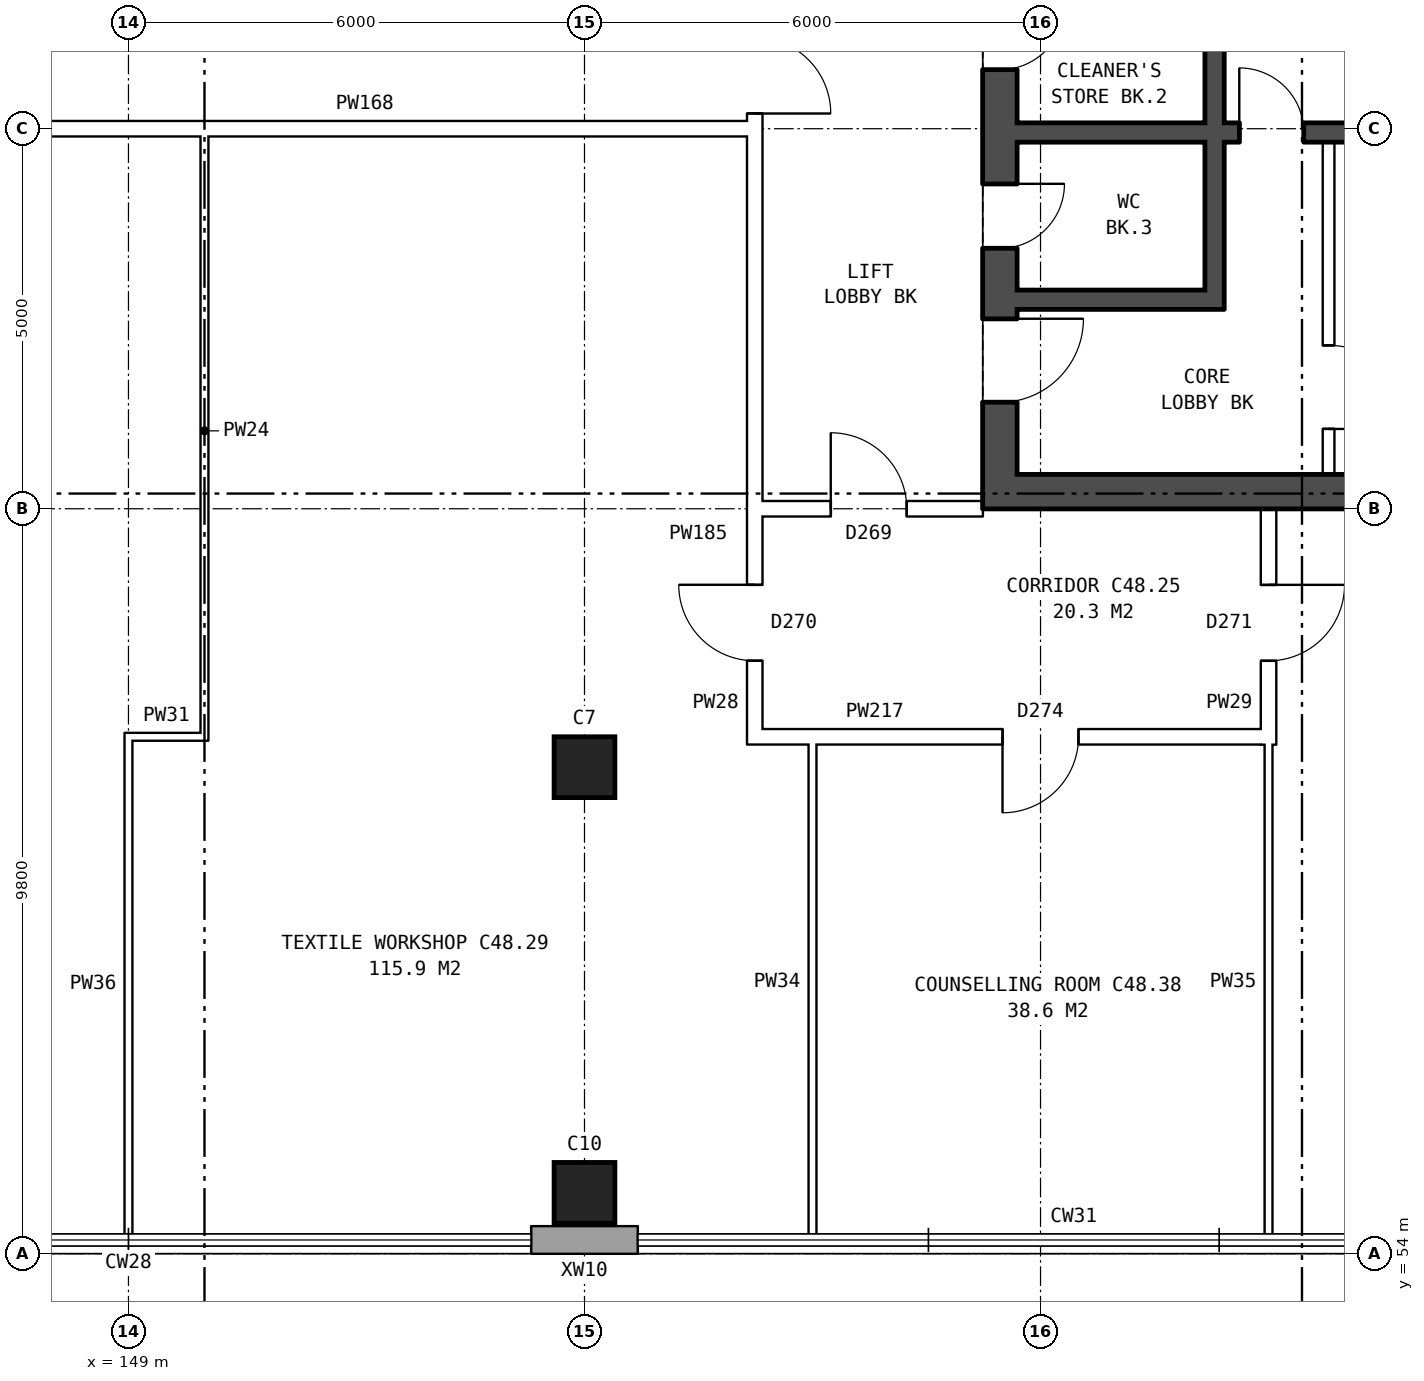
"""IFC4 building model, lengths in metres.
Left out: names, types, materials, properties, quantities, classifications, styles, units other than length and angle.
Written with IfcOpenShell. Run it as: python <this file> out.ifc"""

import sys

from ifc_helpers import new_model, si_unit, direction, frame, frame_2d, origin, origin_2d, place, context, subcontext, project, spatial, rectangle, extrude, element, fill, save


model = new_model("IFC4")
c1 = context("Model", 3, precision=1e-05, world=origin(), true_north=direction((0.0, 1.0)))
c2 = subcontext(c1, "Body", "Model", "MODEL_VIEW")
j1 = project(units=[si_unit("LENGTHUNIT", "METRE"), si_unit("PLANEANGLEUNIT", "RADIAN")], contexts=[c1])
p1 = place(None, origin())
s1 = spatial("IfcSite", under=j1, at=p1, CompositionType="ELEMENT")
p2 = place(p1, origin())
s2 = spatial("IfcBuilding", under=s1, at=p2, CompositionType="ELEMENT")
p3 = place(p2, frame((0.0, 0.0, 171.6)))
s3 = spatial("IfcBuildingStorey", under=s2, at=p3, CompositionType="ELEMENT", Elevation=171.6)
for number, where, z_axis, x_axis in (
    (1, (155.0, 54.8, 0.0), (0.0, 0.0, 1.0), (1.0, 0.0, 0.0)),
    (2, (155.0, 60.4, 0.0), (0.0, 0.0, 1.0), (1.0, 0.0, 0.0)),
):
    element("IfcColumn", number, at=place(p3, frame(where, z_axis=z_axis, x_axis=x_axis)), inside=s3, PredefinedType="COLUMN", context=c2, shape_type="SweptSolid", body=[
        extrude(rectangle(XDim=0.8, YDim=0.8, at=origin_2d()), origin(), (0.0, 0.0, 1.0), 3.6),
    ])
p4 = place(p3, frame((154.3, 54.18, 0.0), z_axis=(0.0, 0.0, 1.0), x_axis=(1.0, 0.0, 0.0)))
e3 = element("IfcWall", 3, at=p4, inside=s3, PredefinedType="STANDARD", context=c2, shape_type="SweptSolid", body=[
    extrude(rectangle(XDim=1.4, YDim=0.36, at=frame_2d((0.7, 0.0))), origin(), (0.0, 0.0, 1.0), 3.6),
])
p5 = place(p3, frame((160.465, 76.2, 0.0), z_axis=(0.0, 0.0, 1.0), x_axis=(0.0, -1.0, 0.0)))
e4 = element("IfcWall", 4, at=p5, inside=s3, PredefinedType="SHEAR", context=c2, shape_type="SweptSolid", body=[
    extrude(rectangle(XDim=12.4, YDim=0.45, at=frame_2d((6.2, 0.0))), origin(), (0.0, 0.0, 1.0), 3.6),
])
p6 = place(p5, frame((1.325, 0.0, 0.0)))
e5 = element("IfcOpeningElement", 5, at=p6, cuts=e4, PredefinedType="OPENING", context=c2, shape_type="SweptSolid", body=[
    extrude(rectangle(XDim=1.1, YDim=2.1, at=frame_2d((0.55, 1.05))), frame((0.0, 0.235, 0.0), z_axis=(0.0, -1.0, 0.0), x_axis=(1.0, 0.0, 0.0)), (0.0, 0.0, 1.0), 0.47),
])
p7 = place(p5, frame((3.625, 0.0, 0.0)))
e6 = element("IfcOpeningElement", 6, at=p7, cuts=e4, PredefinedType="OPENING", context=c2, shape_type="SweptSolid", body=[
    extrude(rectangle(XDim=0.85, YDim=2.1, at=frame_2d((0.425, 1.05))), frame((0.0, 0.235, 0.0), z_axis=(0.0, -1.0, 0.0), x_axis=(1.0, 0.0, 0.0)), (0.0, 0.0, 1.0), 0.47),
])
p8 = place(p5, frame((5.775, 0.0, 0.0)))
e7 = element("IfcOpeningElement", 7, at=p8, cuts=e4, PredefinedType="OPENING", context=c2, shape_type="SweptSolid", body=[
    extrude(rectangle(XDim=0.85, YDim=2.1, at=frame_2d((0.425, 1.05))), frame((0.0, 0.235, 0.0), z_axis=(0.0, -1.0, 0.0), x_axis=(1.0, 0.0, 0.0)), (0.0, 0.0, 1.0), 0.47),
])
p9 = place(p5, frame((9.9, 0.0, 0.0)))
e8 = element("IfcOpeningElement", 8, at=p9, cuts=e4, PredefinedType="OPENING", context=c2, shape_type="SweptSolid", body=[
    extrude(rectangle(XDim=1.1, YDim=2.1, at=frame_2d((0.55, 1.05))), frame((0.0, 0.235, 0.0), z_axis=(0.0, -1.0, 0.0), x_axis=(1.0, 0.0, 0.0)), (0.0, 0.0, 1.0), 0.47),
])
p10 = place(p5, frame((8.125, 0.0, 0.0)))
e9 = element("IfcOpeningElement", 9, at=p10, cuts=e4, PredefinedType="OPENING", context=c2, shape_type="SweptSolid", body=[
    extrude(rectangle(XDim=0.85, YDim=2.1, at=frame_2d((0.425, 1.05))), frame((0.0, 0.235, 0.0), z_axis=(0.0, -1.0, 0.0), x_axis=(1.0, 0.0, 0.0)), (0.0, 0.0, 1.0), 0.47),
])
p11 = place(p3, frame((160.69, 64.025, 0.0), z_axis=(0.0, 0.0, 1.0), x_axis=(1.0, 0.0, 0.0)))
e10 = element("IfcWall", 10, at=p11, inside=s3, PredefinedType="SHEAR", context=c2, shape_type="SweptSolid", body=[
    extrude(rectangle(XDim=7.5, YDim=0.45, at=frame_2d((3.75, 0.0))), origin(), (0.0, 0.0, 1.0), 3.6),
])
p12 = place(p3, frame((160.69, 68.75, 0.0), z_axis=(0.0, 0.0, 1.0), x_axis=(1.0, 0.0, 0.0)))
e11 = element("IfcWall", 11, at=p12, inside=s3, PredefinedType="SHEAR", context=c2, shape_type="SweptSolid", body=[
    extrude(rectangle(XDim=7.5, YDim=0.25, at=frame_2d((3.75, 0.0))), origin(), (0.0, 0.0, 1.0), 3.6),
])
p13 = place(p12, frame((5.075, 0.0, 0.0)))
e12 = element("IfcOpeningElement", 12, at=p13, cuts=e11, PredefinedType="OPENING", context=c2, shape_type="SweptSolid", body=[
    extrude(rectangle(XDim=1.1, YDim=2.1, at=frame_2d((0.55, 1.05))), frame((0.0, 0.135, 0.0), z_axis=(0.0, -1.0, 0.0), x_axis=(1.0, 0.0, 0.0)), (0.0, 0.0, 1.0), 0.27),
])
p14 = place(p12, frame((2.925, 0.0, 0.0)))
e13 = element("IfcOpeningElement", 13, at=p14, cuts=e11, PredefinedType="OPENING", context=c2, shape_type="SweptSolid", body=[
    extrude(rectangle(XDim=0.85, YDim=2.1, at=frame_2d((0.425, 1.05))), frame((0.0, 0.135, 0.0), z_axis=(0.0, -1.0, 0.0), x_axis=(1.0, 0.0, 0.0)), (0.0, 0.0, 1.0), 0.27),
])
p15 = place(p3, frame((160.69, 66.55, 0.0), z_axis=(0.0, 0.0, 1.0), x_axis=(1.0, 0.0, 0.0)))
e14 = element("IfcWall", 14, at=p15, inside=s3, PredefinedType="SHEAR", context=c2, shape_type="SweptSolid", body=[
    extrude(rectangle(XDim=2.475, YDim=0.25, at=frame_2d((1.238, 0.0))), origin(), (0.0, 0.0, 1.0), 3.6),
])
p16 = place(p3, frame((163.29, 73.025, 0.0), z_axis=(0.0, 0.0, 1.0), x_axis=(0.0, -1.0, 0.0)))
e15 = element("IfcWall", 15, at=p16, inside=s3, PredefinedType="SHEAR", context=c2, shape_type="SweptSolid", body=[
    extrude(rectangle(XDim=4.15, YDim=0.25, at=frame_2d((2.075, 0.0))), origin(), (0.0, 0.0, 1.0), 3.6),
])
p17 = place(p3, frame((163.29, 68.625, 0.0), z_axis=(0.0, 0.0, 1.0), x_axis=(0.0, -1.0, 0.0)))
e16 = element("IfcWall", 16, at=p17, inside=s3, PredefinedType="SHEAR", context=c2, shape_type="SweptSolid", body=[
    extrude(rectangle(XDim=2.2, YDim=0.25, at=frame_2d((1.1, 0.0))), origin(), (0.0, 0.0, 1.0), 3.6),
])
p18 = place(p3, frame((164.79, 68.625, 0.0), z_axis=(0.0, 0.0, 1.0), x_axis=(0.0, -1.0, 0.0)))
e17 = element("IfcWall", 17, at=p18, inside=s3, PredefinedType="PARTITIONING", context=c2, shape_type="SweptSolid", body=[
    extrude(rectangle(XDim=4.375, YDim=0.15, at=frame_2d((2.188, 0.0))), origin(), (0.0, 0.0, 1.0), 3.6),
])
p19 = place(p18, frame((2.675, 0.0, 0.0)))
e18 = element("IfcOpeningElement", 18, at=p19, cuts=e17, PredefinedType="OPENING", context=c2, shape_type="SweptSolid", body=[
    extrude(rectangle(XDim=1.1, YDim=2.1, at=frame_2d((0.55, 1.05))), frame((0.0, 0.085, 0.0), z_axis=(0.0, -1.0, 0.0), x_axis=(1.0, 0.0, 0.0)), (0.0, 0.0, 1.0), 0.17),
])
p20 = place(p3, frame((157.24, 63.9, 0.0), z_axis=(0.0, 0.0, 1.0), x_axis=(0.0, 1.0, 0.0)))
e19 = element("IfcWall", 19, at=p20, inside=s3, PredefinedType="PARTITIONING", context=c2, shape_type="SweptSolid", body=[
    extrude(rectangle(XDim=12.2, YDim=0.2, at=frame_2d((6.1, 0.0))), origin(), (0.0, 0.0, 1.0), 3.6),
])
p21 = place(p20, frame((5.1, 0.0, 0.0)))
e20 = element("IfcOpeningElement", 20, at=p21, cuts=e19, PredefinedType="OPENING", context=c2, shape_type="SweptSolid", body=[
    extrude(rectangle(XDim=2.0, YDim=2.1, at=frame_2d((1.0, 1.05))), frame((0.0, 0.11, 0.0), z_axis=(0.0, -1.0, 0.0), x_axis=(1.0, 0.0, 0.0)), (0.0, 0.0, 1.0), 0.22),
])
p22 = place(p3, frame((157.14, 60.8, 0.0), z_axis=(0.0, 0.0, 1.0), x_axis=(1.0, 0.0, 0.0)))
e21 = element("IfcWall", 21, at=p22, inside=s3, PredefinedType="PARTITIONING", context=c2, shape_type="SweptSolid", body=[
    extrude(rectangle(XDim=6.96, YDim=0.2, at=frame_2d((3.48, 0.0))), origin(), (0.0, 0.0, 1.0), 3.6),
])
p23 = place(p22, frame((3.36, 0.0, 0.0)))
e22 = element("IfcOpeningElement", 22, at=p23, cuts=e21, PredefinedType="OPENING", context=c2, shape_type="SweptSolid", body=[
    extrude(rectangle(XDim=1.0, YDim=2.1, at=frame_2d((0.5, 1.05))), frame((0.0, 0.11, 0.0), z_axis=(0.0, -1.0, 0.0), x_axis=(1.0, 0.0, 0.0)), (0.0, 0.0, 1.0), 0.22),
])
p24 = place(p3, frame((148.95, 60.8, 0.0), z_axis=(0.0, 0.0, 1.0), x_axis=(1.0, 0.0, 0.0)))
e23 = element("IfcWall", 23, at=p24, inside=s3, PredefinedType="PARTITIONING", context=c2, shape_type="SweptSolid", body=[
    extrude(rectangle(XDim=1.1, YDim=0.1, at=frame_2d((0.55, 0.0))), origin(), (0.0, 0.0, 1.0), 3.6),
])
p25 = place(p3, frame((157.14, 63.8, 0.0), z_axis=(0.0, 0.0, 1.0), x_axis=(1.0, 0.0, 0.0)))
e24 = element("IfcWall", 24, at=p25, inside=s3, PredefinedType="PARTITIONING", context=c2, shape_type="SweptSolid", body=[
    extrude(rectangle(XDim=3.1, YDim=0.2, at=frame_2d((1.55, 0.0))), origin(), (0.0, 0.0, 1.0), 3.6),
])
p26 = place(p25, frame((1.1, 0.0, 0.0)))
e25 = element("IfcOpeningElement", 25, at=p26, cuts=e24, PredefinedType="OPENING", context=c2, shape_type="SweptSolid", body=[
    extrude(rectangle(XDim=1.0, YDim=2.1, at=frame_2d((0.5, 1.05))), frame((0.0, 0.11, 0.0), z_axis=(0.0, -1.0, 0.0), x_axis=(1.0, 0.0, 0.0)), (0.0, 0.0, 1.0), 0.22),
])
p27 = place(p3, frame((142.76, 68.8, 0.0), z_axis=(0.0, 0.0, 1.0), x_axis=(1.0, 0.0, 0.0)))
e26 = element("IfcWall", 26, at=p27, inside=s3, PredefinedType="PARTITIONING", context=c2, shape_type="SweptSolid", body=[
    extrude(rectangle(XDim=14.48, YDim=0.2, at=frame_2d((7.24, 0.0))), origin(), (0.0, 0.0, 1.0), 3.6),
])
p28 = place(p27, frame((3.02, 0.0, 0.0)))
e27 = element("IfcOpeningElement", 27, at=p28, cuts=e26, PredefinedType="OPENING", context=c2, shape_type="SweptSolid", body=[
    extrude(rectangle(XDim=1.2, YDim=2.1, at=frame_2d((0.6, 1.05))), frame((0.0, 0.11, 0.0), z_axis=(0.0, -1.0, 0.0), x_axis=(1.0, 0.0, 0.0)), (0.0, 0.0, 1.0), 0.22),
])
p29 = place(p3, frame((149.0, 54.24, 0.0), z_axis=(0.0, 0.0, 1.0), x_axis=(0.0, 1.0, 0.0)))
e28 = element("IfcWall", 28, at=p29, inside=s3, PredefinedType="PARTITIONING", context=c2, shape_type="SweptSolid", body=[
    extrude(rectangle(XDim=6.61, YDim=0.1, at=frame_2d((3.305, 0.0))), origin(), (0.0, 0.0, 1.0), 3.6),
])
p30 = place(p3, frame((150.0, 60.75, 0.0), z_axis=(0.0, 0.0, 1.0), x_axis=(0.0, 1.0, 0.0)))
e29 = element("IfcWall", 29, at=p30, inside=s3, PredefinedType="PARTITIONING", context=c2, shape_type="SweptSolid", body=[
    extrude(rectangle(XDim=8.15, YDim=0.1, at=frame_2d((4.075, 0.0))), origin(), (0.0, 0.0, 1.0), 3.6),
])
p31 = place(p3, frame((157.24, 60.7, 0.0), z_axis=(0.0, 0.0, 1.0), x_axis=(0.0, 1.0, 0.0)))
e30 = element("IfcWall", 30, at=p31, inside=s3, PredefinedType="PARTITIONING", context=c2, shape_type="SweptSolid", body=[
    extrude(rectangle(XDim=3.2, YDim=0.2, at=frame_2d((1.6, 0.0))), origin(), (0.0, 0.0, 1.0), 3.6),
])
p32 = place(p31, frame((1.1, 0.0, 0.0)))
e31 = element("IfcOpeningElement", 31, at=p32, cuts=e30, PredefinedType="OPENING", context=c2, shape_type="SweptSolid", body=[
    extrude(rectangle(XDim=1.0, YDim=2.1, at=frame_2d((0.5, 1.05))), frame((0.0, 0.11, 0.0), z_axis=(0.0, -1.0, 0.0), x_axis=(1.0, 0.0, 0.0)), (0.0, 0.0, 1.0), 0.22),
])
p33 = place(p3, frame((158.0, 54.24, 0.0), z_axis=(0.0, 0.0, 1.0), x_axis=(0.0, 1.0, 0.0)))
e32 = element("IfcWall", 32, at=p33, inside=s3, PredefinedType="PARTITIONING", context=c2, shape_type="SweptSolid", body=[
    extrude(rectangle(XDim=6.66, YDim=0.1, at=frame_2d((3.33, 0.0))), origin(), (0.0, 0.0, 1.0), 3.6),
])
p34 = place(p3, frame((164.0, 60.698, 0.0), z_axis=(0.0, 0.0, 1.0), x_axis=(0.0, 1.0, 0.0)))
e33 = element("IfcWall", 33, at=p34, inside=s3, PredefinedType="PARTITIONING", context=c2, shape_type="SweptSolid", body=[
    extrude(rectangle(XDim=3.102, YDim=0.2, at=frame_2d((1.551, 0.0))), origin(), (0.0, 0.0, 1.0), 3.6),
])
p35 = place(p34, frame((1.101, 0.0, 0.0)))
e34 = element("IfcOpeningElement", 34, at=p35, cuts=e33, PredefinedType="OPENING", context=c2, shape_type="SweptSolid", body=[
    extrude(rectangle(XDim=1.0, YDim=2.1, at=frame_2d((0.5, 1.05))), frame((0.0, 0.11, 0.0), z_axis=(0.0, -1.0, 0.0), x_axis=(1.0, 0.0, 0.0)), (0.0, 0.0, 1.0), 0.22),
])
p36 = place(p3, frame((164.0, 54.24, 0.0), z_axis=(0.0, 0.0, 1.0), x_axis=(0.0, 1.0, 0.0)))
e35 = element("IfcWall", 35, at=p36, inside=s3, PredefinedType="PARTITIONING", context=c2, shape_type="SweptSolid", body=[
    extrude(rectangle(XDim=6.662, YDim=0.1, at=frame_2d((3.331, 0.0))), origin(), (0.0, 0.0, 1.0), 3.6),
])
p37 = place(p8, origin())
e36 = element("IfcDoor", 36, at=p37, inside=s3, OperationType="SINGLE_SWING_LEFT", PredefinedType="DOOR", context=c2, shape_type="SweptSolid", body=[
    extrude(rectangle(XDim=0.85, YDim=2.1, at=frame_2d((0.425, 1.05))), frame((0.0, 0.21, 0.0), z_axis=(0.0, -1.0, 0.0), x_axis=(1.0, 0.0, 0.0)), (0.0, 0.0, 1.0), 0.05),
])
fill(e7, e36)
p38 = place(p9, origin())
e37 = element("IfcDoor", 37, at=p38, inside=s3, OperationType="SINGLE_SWING_LEFT", PredefinedType="DOOR", context=c2, shape_type="SweptSolid", body=[
    extrude(rectangle(XDim=1.1, YDim=2.1, at=frame_2d((0.55, 1.05))), frame((0.0, 0.21, 0.0), z_axis=(0.0, -1.0, 0.0), x_axis=(1.0, 0.0, 0.0)), (0.0, 0.0, 1.0), 0.05),
])
fill(e8, e37)
p39 = place(p19, origin())
e38 = element("IfcDoor", 38, at=p39, inside=s3, OperationType="SINGLE_SWING_RIGHT", PredefinedType="DOOR", context=c2, shape_type="SweptSolid", body=[
    extrude(rectangle(XDim=1.1, YDim=2.1, at=frame_2d((0.55, 1.05))), frame((0.0, 0.025, 0.0), z_axis=(0.0, -1.0, 0.0), x_axis=(1.0, 0.0, 0.0)), (0.0, 0.0, 1.0), 0.05),
])
fill(e18, e38)
p40 = place(p10, origin())
e39 = element("IfcDoor", 39, at=p40, inside=s3, OperationType="SINGLE_SWING_LEFT", PredefinedType="DOOR", context=c2, shape_type="SweptSolid", body=[
    extrude(rectangle(XDim=0.85, YDim=2.1, at=frame_2d((0.425, 1.05))), frame((0.0, 0.21, 0.0), z_axis=(0.0, -1.0, 0.0), x_axis=(1.0, 0.0, 0.0)), (0.0, 0.0, 1.0), 0.05),
])
fill(e9, e39)
p41 = place(p14, origin())
e40 = element("IfcDoor", 40, at=p41, inside=s3, OperationType="SINGLE_SWING_LEFT", PredefinedType="DOOR", context=c2, shape_type="SweptSolid", body=[
    extrude(rectangle(XDim=0.85, YDim=2.1, at=frame_2d((0.425, 1.05))), frame((0.0, 0.025, 0.0), z_axis=(0.0, -1.0, 0.0), x_axis=(1.0, 0.0, 0.0)), (0.0, 0.0, 1.0), 0.05),
])
fill(e13, e40)
p42 = place(p21, frame((2.0, 0.0, 0.0), z_axis=(0.0, 0.0, 1.0), x_axis=(-1.0, 0.0, 0.0)))
e41 = element("IfcDoor", 41, at=p42, inside=s3, OperationType="DOUBLE_DOOR_SINGLE_SWING", PredefinedType="DOOR", context=c2, shape_type="SweptSolid", body=[
    extrude(rectangle(XDim=2.0, YDim=2.1, at=frame_2d((1.0, 1.05))), frame((0.0, 0.025, 0.0), z_axis=(0.0, -1.0, 0.0), x_axis=(1.0, 0.0, 0.0)), (0.0, 0.0, 1.0), 0.05),
])
fill(e20, e41)
p43 = place(p23, frame((1.0, 0.0, 0.0), z_axis=(0.0, 0.0, 1.0), x_axis=(-1.0, 0.0, 0.0)))
e42 = element("IfcDoor", 42, at=p43, inside=s3, OperationType="SINGLE_SWING_RIGHT", PredefinedType="DOOR", context=c2, shape_type="SweptSolid", body=[
    extrude(rectangle(XDim=1.0, YDim=2.1, at=frame_2d((0.5, 1.05))), frame((0.0, 0.025, 0.0), z_axis=(0.0, -1.0, 0.0), x_axis=(1.0, 0.0, 0.0)), (0.0, 0.0, 1.0), 0.05),
])
fill(e22, e42)
p44 = place(p26, origin())
e43 = element("IfcDoor", 43, at=p44, inside=s3, OperationType="SINGLE_SWING_LEFT", PredefinedType="DOOR", context=c2, shape_type="SweptSolid", body=[
    extrude(rectangle(XDim=1.0, YDim=2.1, at=frame_2d((0.5, 1.05))), frame((0.0, 0.025, 0.0), z_axis=(0.0, -1.0, 0.0), x_axis=(1.0, 0.0, 0.0)), (0.0, 0.0, 1.0), 0.05),
])
fill(e25, e43)
p45 = place(p32, origin())
e44 = element("IfcDoor", 44, at=p45, inside=s3, OperationType="SINGLE_SWING_RIGHT", PredefinedType="DOOR", context=c2, shape_type="SweptSolid", body=[
    extrude(rectangle(XDim=1.0, YDim=2.1, at=frame_2d((0.5, 1.05))), frame((0.0, 0.025, 0.0), z_axis=(0.0, -1.0, 0.0), x_axis=(1.0, 0.0, 0.0)), (0.0, 0.0, 1.0), 0.05),
])
fill(e31, e44)
p46 = place(p35, frame((1.0, 0.0, 0.0), z_axis=(0.0, 0.0, 1.0), x_axis=(-1.0, 0.0, 0.0)))
e45 = element("IfcDoor", 45, at=p46, inside=s3, OperationType="SINGLE_SWING_LEFT", PredefinedType="DOOR", context=c2, shape_type="SweptSolid", body=[
    extrude(rectangle(XDim=1.0, YDim=2.1, at=frame_2d((0.5, 1.05))), frame((0.0, 0.025, 0.0), z_axis=(0.0, -1.0, 0.0), x_axis=(1.0, 0.0, 0.0)), (0.0, 0.0, 1.0), 0.05),
])
fill(e34, e45)
save(model, sys.argv[1])
